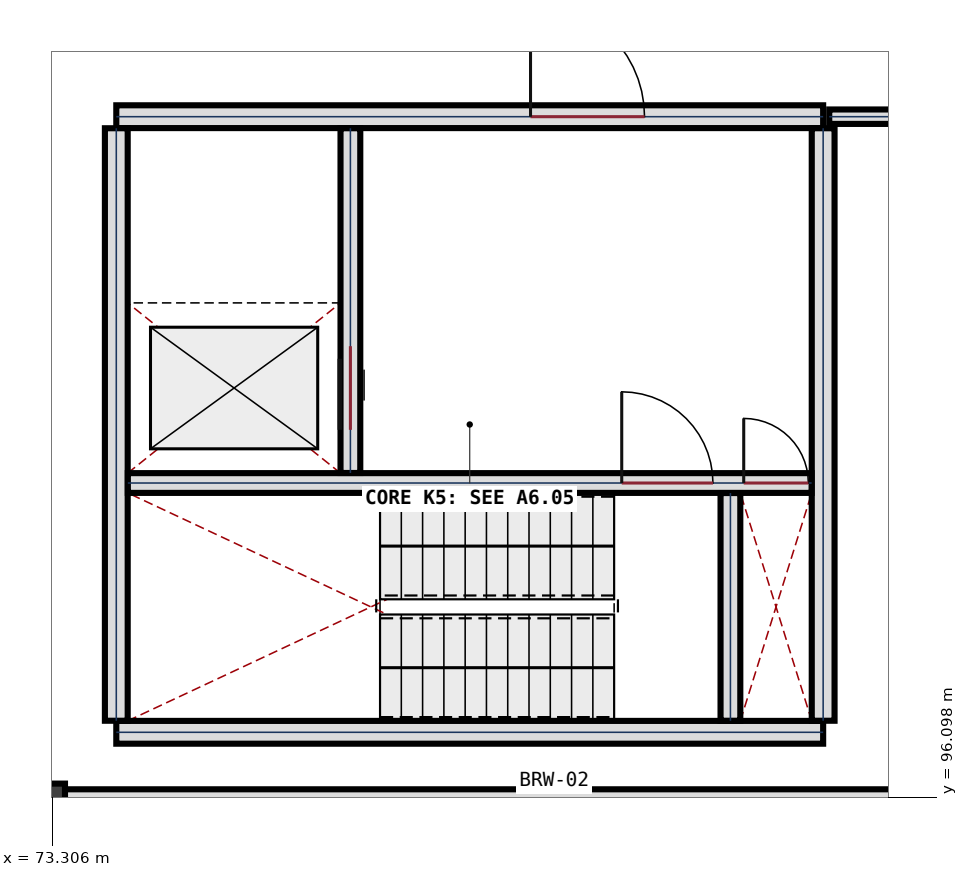
"""IFC4 building model, lengths in metres.
Left out: names, types, materials, properties, quantities, classifications, styles, units other than length and angle.
Written with IfcOpenShell. Run it as: python <this file> out.ifc"""

import sys

from ifc_helpers import new_model, si_unit, direction, frame, frame_2d, origin, origin_2d, place, context, subcontext, project, spatial, rectangle, extrude, element, fill, save


model = new_model("IFC4")
c1 = context("Model", 3, precision=1e-05, world=origin(), true_north=direction((0.0, 1.0)))
c2 = subcontext(c1, "Body", "Model", "MODEL_VIEW")
j1 = project(units=[si_unit("LENGTHUNIT", "METRE"), si_unit("PLANEANGLEUNIT", "RADIAN")], contexts=[c1])
p1 = place(None, origin())
s1 = spatial("IfcSite", under=j1, at=p1, CompositionType="ELEMENT")
p2 = place(p1, origin())
s2 = spatial("IfcBuilding", under=s1, at=p2, CompositionType="ELEMENT")
p3 = place(p2, frame((0.0, 0.0, -4.2)))
s3 = spatial("IfcBuildingStorey", under=s2, at=p3, CompositionType="ELEMENT", Elevation=-4.2)
p4 = place(p3, frame((73.2, 96.0, 0.0), z_axis=(0.0, 0.0, 1.0), x_axis=(1.0, 0.0, 0.0)))
e1 = element("IfcColumn", 1, at=p4, inside=s3, PredefinedType="COLUMN", context=c2, shape_type="SweptSolid", body=[
    extrude(rectangle(XDim=0.55, YDim=0.55, at=origin_2d()), origin(), (0.0, 0.0, 1.0), 4.2),
])
p5 = place(p3, frame((86.352, 96.0, 0.0), z_axis=(0.0, 0.0, 1.0), x_axis=(-1.0, 0.0, 0.0)))
e2 = element("IfcWall", 2, at=p5, inside=s3, PredefinedType="USERDEFINED", context=c2, shape_type="SweptSolid", body=[
    extrude(rectangle(XDim=12.879, YDim=0.4, at=frame_2d((6.439, 0.0))), origin(), (0.0, 0.0, 1.0), 3.92),
])
p6 = place(p3, frame((83.45, 96.95, 0.0), z_axis=(0.0, 0.0, 1.0), x_axis=(-1.0, 0.0, 0.0)))
e3 = element("IfcWall", 3, at=p6, inside=s3, PredefinedType="SHEAR", context=c2, shape_type="SweptSolid", body=[
    extrude(rectangle(XDim=9.3, YDim=0.3, at=frame_2d((4.65, 0.0))), origin(), (0.0, 0.0, 1.0), 4.2),
])
p7 = place(p3, frame((74.15, 105.05, 0.0), z_axis=(0.0, 0.0, 1.0), x_axis=(1.0, 0.0, 0.0)))
e4 = element("IfcWall", 4, at=p7, inside=s3, PredefinedType="SHEAR", context=c2, shape_type="SweptSolid", body=[
    extrude(rectangle(XDim=9.3, YDim=0.3, at=frame_2d((4.65, 0.0))), origin(), (0.0, 0.0, 1.0), 4.2),
])
p8 = place(p7, frame((5.45, 0.0, 0.0)))
e5 = element("IfcOpeningElement", 5, at=p8, cuts=e4, PredefinedType="OPENING", context=c2, shape_type="SweptSolid", body=[
    extrude(rectangle(XDim=1.5, YDim=2.25, at=frame_2d((0.75, 1.125))), frame((0.0, 0.16, 0.0), z_axis=(0.0, -1.0, 0.0), x_axis=(1.0, 0.0, 0.0)), (0.0, 0.0, 1.0), 0.32),
])
for number, where, z_axis, x_axis in (
    (6, (74.15, 97.102, 0.0), (0.0, 0.0, 1.0), (0.0, 1.0, 0.0)),
    (7, (83.45, 104.898, 0.0), (0.0, 0.0, 1.0), (0.0, -1.0, 0.0)),
):
    element("IfcWall", number, at=place(p3, frame(where, z_axis=z_axis, x_axis=x_axis)), inside=s3, PredefinedType="SHEAR", context=c2, shape_type="SweptSolid", body=[
        extrude(rectangle(XDim=7.796, YDim=0.3, at=frame_2d((3.898, 0.0))), origin(), (0.0, 0.0, 1.0), 4.2),
    ])
p9 = place(p3, frame((74.302, 100.23, 0.0), z_axis=(0.0, 0.0, 1.0), x_axis=(1.0, 0.0, 0.0)))
e8 = element("IfcWall", 8, at=p9, inside=s3, PredefinedType="SHEAR", context=c2, shape_type="SweptSolid", body=[
    extrude(rectangle(XDim=8.996, YDim=0.26, at=frame_2d((4.498, 0.0))), origin(), (0.0, 0.0, 1.0), 4.2),
])
p10 = place(p9, frame((6.498, 0.0, 0.0)))
e9 = element("IfcOpeningElement", 9, at=p10, cuts=e8, PredefinedType="OPENING", context=c2, shape_type="SweptSolid", body=[
    extrude(rectangle(XDim=1.2, YDim=2.2, at=frame_2d((0.6, 1.1))), frame((0.0, 0.14, 0.0), z_axis=(0.0, -1.0, 0.0), x_axis=(1.0, 0.0, 0.0)), (0.0, 0.0, 1.0), 0.28),
])
p11 = place(p9, frame((8.103, 0.0, 0.0)))
e10 = element("IfcOpeningElement", 10, at=p11, cuts=e8, PredefinedType="OPENING", context=c2, shape_type="SweptSolid", body=[
    extrude(rectangle(XDim=0.85, YDim=2.05, at=frame_2d((0.425, 1.025))), frame((0.0, 0.14, 0.0), z_axis=(0.0, -1.0, 0.0), x_axis=(1.0, 0.0, 0.0)), (0.0, 0.0, 1.0), 0.28),
])
p12 = place(p3, frame((82.23, 97.102, 0.0), z_axis=(0.0, 0.0, 1.0), x_axis=(0.0, 1.0, 0.0)))
e11 = element("IfcWall", 11, at=p12, inside=s3, PredefinedType="SHEAR", context=c2, shape_type="SweptSolid", body=[
    extrude(rectangle(XDim=2.996, YDim=0.26, at=frame_2d((1.498, 0.0))), origin(), (0.0, 0.0, 1.0), 4.2),
])
p13 = place(p3, frame((77.23, 100.362, 0.0), z_axis=(0.0, 0.0, 1.0), x_axis=(0.0, 1.0, 0.0)))
e12 = element("IfcWall", 12, at=p13, inside=s3, PredefinedType="SHEAR", context=c2, shape_type="SweptSolid", body=[
    extrude(rectangle(XDim=4.536, YDim=0.26, at=frame_2d((2.268, 0.0))), origin(), (0.0, 0.0, 1.0), 4.2),
])
p14 = place(p13, frame((0.568, 0.0, 0.0)))
e13 = element("IfcOpeningElement", 13, at=p14, cuts=e12, PredefinedType="OPENING", context=c2, shape_type="SweptSolid", body=[
    extrude(rectangle(XDim=1.1, YDim=2.15, at=frame_2d((0.55, 1.075))), frame((0.0, 0.14, 0.0), z_axis=(0.0, -1.0, 0.0), x_axis=(1.0, 0.0, 0.0)), (0.0, 0.0, 1.0), 0.28),
])
p15 = place(p3, frame((83.53, 105.05, 0.0), z_axis=(0.0, 0.0, 1.0), x_axis=(1.0, 0.0, 0.0)))
e14 = element("IfcWall", 14, at=p15, inside=s3, PredefinedType="PARTITIONING", context=c2, shape_type="SweptSolid", body=[
    extrude(rectangle(XDim=42.17, YDim=0.19, at=frame_2d((21.085, 0.0))), origin(), (0.0, 0.0, 1.0), 2.91),
])
p16 = place(p15, frame((22.87, 0.0, 0.0)))
e15 = element("IfcOpeningElement", 15, at=p16, cuts=e14, PredefinedType="OPENING", context=c2, shape_type="SweptSolid", body=[
    extrude(rectangle(XDim=1.2, YDim=2.2, at=frame_2d((0.6, 1.1))), frame((0.0, 0.105, 0.0), z_axis=(0.0, -1.0, 0.0), x_axis=(1.0, 0.0, 0.0)), (0.0, 0.0, 1.0), 0.21),
])
p17 = place(p8, origin())
e16 = element("IfcDoor", 16, at=p17, inside=s3, OperationType="SINGLE_SWING_LEFT", PredefinedType="DOOR", context=c2, shape_type="SweptSolid", body=[
    extrude(rectangle(XDim=1.5, YDim=2.25, at=frame_2d((0.75, 1.125))), frame((0.0, 0.032, 0.0), z_axis=(0.0, -1.0, 0.0), x_axis=(1.0, 0.0, 0.0)), (0.0, 0.0, 1.0), 0.065),
])
fill(e5, e16)
p18 = place(p10, origin())
e17 = element("IfcDoor", 17, at=p18, inside=s3, OperationType="SINGLE_SWING_LEFT", PredefinedType="DOOR", context=c2, shape_type="SweptSolid", body=[
    extrude(rectangle(XDim=1.2, YDim=2.2, at=frame_2d((0.6, 1.1))), frame((0.0, 0.032, 0.0), z_axis=(0.0, -1.0, 0.0), x_axis=(1.0, 0.0, 0.0)), (0.0, 0.0, 1.0), 0.065),
])
fill(e9, e17)
p19 = place(p11, origin())
e18 = element("IfcDoor", 18, at=p19, inside=s3, OperationType="SINGLE_SWING_LEFT", PredefinedType="DOOR", context=c2, shape_type="SweptSolid", body=[
    extrude(rectangle(XDim=0.85, YDim=2.05, at=frame_2d((0.425, 1.025))), frame((0.0, 0.032, 0.0), z_axis=(0.0, -1.0, 0.0), x_axis=(1.0, 0.0, 0.0)), (0.0, 0.0, 1.0), 0.065),
])
fill(e10, e18)
p20 = place(p14, origin())
e19 = element("IfcDoor", 19, at=p20, inside=s3, OperationType="SLIDING_TO_LEFT", PredefinedType="DOOR", context=c2, shape_type="SweptSolid", body=[
    extrude(rectangle(XDim=1.1, YDim=2.15, at=frame_2d((0.55, 1.075))), frame((0.0, 0.032, 0.0), z_axis=(0.0, -1.0, 0.0), x_axis=(1.0, 0.0, 0.0)), (0.0, 0.0, 1.0), 0.065),
])
fill(e13, e19)
save(model, sys.argv[1])
